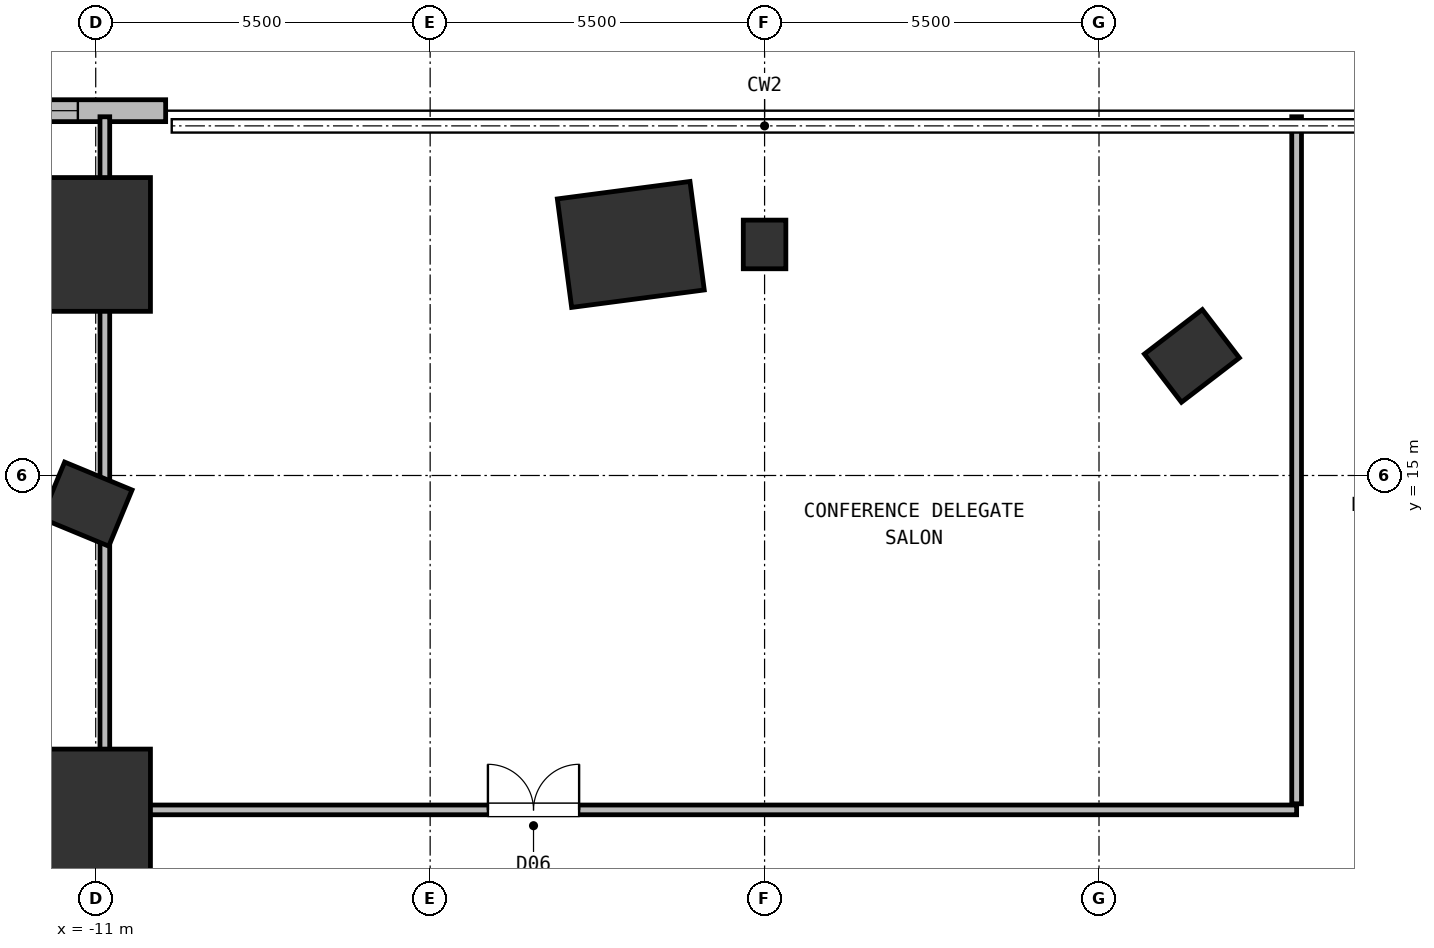
"""IFC4 building model, lengths in metres.
Left out: names, types, materials, properties, quantities, classifications, styles, units other than length and angle.
Written with IfcOpenShell. Run it as: python <this file> out.ifc"""

import sys

from ifc_helpers import new_model, si_unit, direction, frame, frame_2d, origin, origin_2d, place, context, subcontext, project, spatial, rectangle, extrude, element, fill, save


model = new_model("IFC4")
c1 = context("Model", 3, precision=1e-05, world=origin(), true_north=direction((0.0, 1.0)))
c2 = subcontext(c1, "Body", "Model", "MODEL_VIEW")
j1 = project(units=[si_unit("LENGTHUNIT", "METRE"), si_unit("PLANEANGLEUNIT", "RADIAN")], contexts=[c1])
p1 = place(None, origin())
s1 = spatial("IfcSite", under=j1, at=p1, CompositionType="ELEMENT")
p2 = place(p1, origin())
s2 = spatial("IfcBuilding", under=s1, at=p2, CompositionType="ELEMENT")
p3 = place(p2, frame((0.0, 0.0, 26.0)))
s3 = spatial("IfcBuildingStorey", under=s2, at=p3, CompositionType="ELEMENT", Elevation=26.0)
p4 = place(p3, frame((-2.2, 18.8, 0.0), z_axis=(0.0, 0.0, 1.0), x_axis=(-0.13052619222, 0.991444861374, 0.0)))
e1 = element("IfcColumn", 1, at=p4, inside=s3, PredefinedType="COLUMN", context=c2, shape_type="SweptSolid", body=[
    extrude(rectangle(XDim=1.8, YDim=2.2, at=origin_2d()), origin(), (0.0, 0.0, 1.0), 4.5),
])
for number, where, z_axis, x_axis in (
    (2, (-11.148, 14.529, 0.0), (0.0, 0.0, 1.0), (0.383, 0.924, 0.0)),
    (3, (7.028, 16.966, 0.0), (0.0, 0.0, 1.0), (-0.609, 0.793, 0.0)),
):
    element("IfcColumn", number, at=place(p3, frame(where, z_axis=z_axis, x_axis=x_axis)), inside=s3, PredefinedType="COLUMN", context=c2, shape_type="SweptSolid", body=[
        extrude(rectangle(XDim=1.0, YDim=1.2, at=origin_2d()), origin(), (0.0, 0.0, 1.0), 4.5),
    ])
for number, where, z_axis, x_axis in (
    (4, (-11.0, 9.4, 0.0), (0.0, 0.0, 1.0), (1.0, 0.0, 0.0)),
    (5, (-11.0, 18.8, 0.0), (0.0, 0.0, 1.0), (1.0, 0.0, 0.0)),
):
    element("IfcColumn", number, at=place(p3, frame(where, z_axis=z_axis, x_axis=x_axis)), inside=s3, PredefinedType="COLUMN", context=c2, shape_type="SweptSolid", body=[
        extrude(rectangle(XDim=1.8, YDim=2.2, at=origin_2d()), origin(), (0.0, 0.0, 1.0), 4.5),
    ])
p5 = place(p3, frame((0.0, 18.8, 0.0), z_axis=(0.0, 0.0, 1.0), x_axis=(1.0, 0.0, 0.0)))
e6 = element("IfcColumn", 6, at=p5, inside=s3, PredefinedType="COLUMN", context=c2, shape_type="SweptSolid", body=[
    extrude(rectangle(XDim=0.7, YDim=0.8, at=origin_2d()), origin(), (0.0, 0.0, 1.0), 4.5),
])
p6 = place(p3, frame((-31.0, 21.0, 0.0), z_axis=(0.0, 0.0, 1.0), x_axis=(1.0, 0.0, 0.0)))
e7 = element("IfcWall", 7, at=p6, inside=s3, PredefinedType="SOLIDWALL", context=c2, shape_type="SweptSolid", body=[
    extrude(rectangle(XDim=21.15, YDim=0.36, at=frame_2d((10.575, 0.0))), origin(), (0.0, 0.0, 1.0), 4.25),
])
p7 = place(p6, frame((1.444, 0.0, 0.95)))
e8 = element("IfcOpeningElement", 8, at=p7, cuts=e7, PredefinedType="OPENING", context=c2, shape_type="SweptSolid", body=[
    extrude(rectangle(XDim=2.4, YDim=2.6, at=frame_2d((1.2, 1.3))), frame((0.0, 0.19, 0.0), z_axis=(0.0, -1.0, 0.0), x_axis=(1.0, 0.0, 0.0)), (0.0, 0.0, 1.0), 0.38),
])
p8 = place(p6, frame((6.731, 0.0, 0.95)))
e9 = element("IfcOpeningElement", 9, at=p8, cuts=e7, PredefinedType="OPENING", context=c2, shape_type="SweptSolid", body=[
    extrude(rectangle(XDim=2.4, YDim=2.6, at=frame_2d((1.2, 1.3))), frame((0.0, 0.19, 0.0), z_axis=(0.0, -1.0, 0.0), x_axis=(1.0, 0.0, 0.0)), (0.0, 0.0, 1.0), 0.38),
])
p9 = place(p6, frame((12.019, 0.0, 0.95)))
e10 = element("IfcOpeningElement", 10, at=p9, cuts=e7, PredefinedType="OPENING", context=c2, shape_type="SweptSolid", body=[
    extrude(rectangle(XDim=2.4, YDim=2.6, at=frame_2d((1.2, 1.3))), frame((0.0, 0.19, 0.0), z_axis=(0.0, -1.0, 0.0), x_axis=(1.0, 0.0, 0.0)), (0.0, 0.0, 1.0), 0.38),
])
p10 = place(p6, frame((17.306, 0.0, 0.95)))
e11 = element("IfcOpeningElement", 11, at=p10, cuts=e7, PredefinedType="OPENING", context=c2, shape_type="SweptSolid", body=[
    extrude(rectangle(XDim=2.4, YDim=2.6, at=frame_2d((1.2, 1.3))), frame((0.0, 0.19, 0.0), z_axis=(0.0, -1.0, 0.0), x_axis=(1.0, 0.0, 0.0)), (0.0, 0.0, 1.0), 0.38),
])
p11 = place(p3, frame((-10.85, 4.0, 0.0), z_axis=(0.0, 0.0, 1.0), x_axis=(0.0, 1.0, 0.0)))
e12 = element("IfcWall", 12, at=p11, inside=s3, PredefinedType="PARTITIONING", context=c2, shape_type="SweptSolid", body=[
    extrude(rectangle(XDim=16.9, YDim=0.16, at=frame_2d((8.45, 0.0))), origin(), (0.0, 0.0, 1.0), 3.62),
])
p12 = place(p11, frame((2.06, 0.0, 0.0)))
e13 = element("IfcOpeningElement", 13, at=p12, cuts=e12, PredefinedType="OPENING", context=c2, shape_type="SweptSolid", body=[
    extrude(rectangle(XDim=1.5, YDim=2.2, at=frame_2d((0.75, 1.1))), frame((0.0, 0.09, 0.0), z_axis=(0.0, -1.0, 0.0), x_axis=(1.0, 0.0, 0.0)), (0.0, 0.0, 1.0), 0.18),
])
p13 = place(p3, frame((-10.75, 9.5, 0.0), z_axis=(0.0, 0.0, 1.0), x_axis=(1.0, 0.0, 0.0)))
e14 = element("IfcWall", 14, at=p13, inside=s3, PredefinedType="PARTITIONING", context=c2, shape_type="SweptSolid", body=[
    extrude(rectangle(XDim=19.5, YDim=0.16, at=frame_2d((9.75, 0.0))), origin(), (0.0, 0.0, 1.0), 3.33),
])
p14 = place(p13, frame((6.2, 0.0, 0.0)))
e15 = element("IfcOpeningElement", 15, at=p14, cuts=e14, PredefinedType="OPENING", context=c2, shape_type="SweptSolid", body=[
    extrude(rectangle(XDim=1.5, YDim=2.2, at=frame_2d((0.75, 1.1))), frame((0.0, 0.09, 0.0), z_axis=(0.0, -1.0, 0.0), x_axis=(1.0, 0.0, 0.0)), (0.0, 0.0, 1.0), 0.18),
])
p15 = place(p3, frame((8.75, 9.6, 0.0), z_axis=(0.0, 0.0, 1.0), x_axis=(0.0, 1.0, 0.0)))
e16 = element("IfcWall", 16, at=p15, inside=s3, PredefinedType="PARTITIONING", context=c2, shape_type="SweptSolid", body=[
    extrude(rectangle(XDim=11.3, YDim=0.16, at=frame_2d((5.65, 0.0))), origin(), (0.0, 0.0, 1.0), 4.25),
])
p16 = place(p10, origin())
e17 = element("IfcWindow", 17, at=p16, inside=s3, PartitioningType="SINGLE_PANEL", PredefinedType="WINDOW", context=c2, shape_type="SweptSolid", body=[
    extrude(rectangle(XDim=2.4, YDim=2.6, at=frame_2d((1.2, 1.3))), frame((0.0, 0.03, 0.0), z_axis=(0.0, -1.0, 0.0), x_axis=(1.0, 0.0, 0.0)), (0.0, 0.0, 1.0), 0.06),
])
fill(e11, e17)
p17 = place(p14, origin())
e18 = element("IfcDoor", 18, at=p17, inside=s3, OperationType="DOUBLE_DOOR_SINGLE_SWING", PredefinedType="DOOR", context=c2, shape_type="SweptSolid", body=[
    extrude(rectangle(XDim=1.5, YDim=2.2, at=frame_2d((0.75, 1.1))), frame((0.0, 0.025, 0.0), z_axis=(0.0, -1.0, 0.0), x_axis=(1.0, 0.0, 0.0)), (0.0, 0.0, 1.0), 0.05),
])
fill(e15, e18)
save(model, sys.argv[1])
